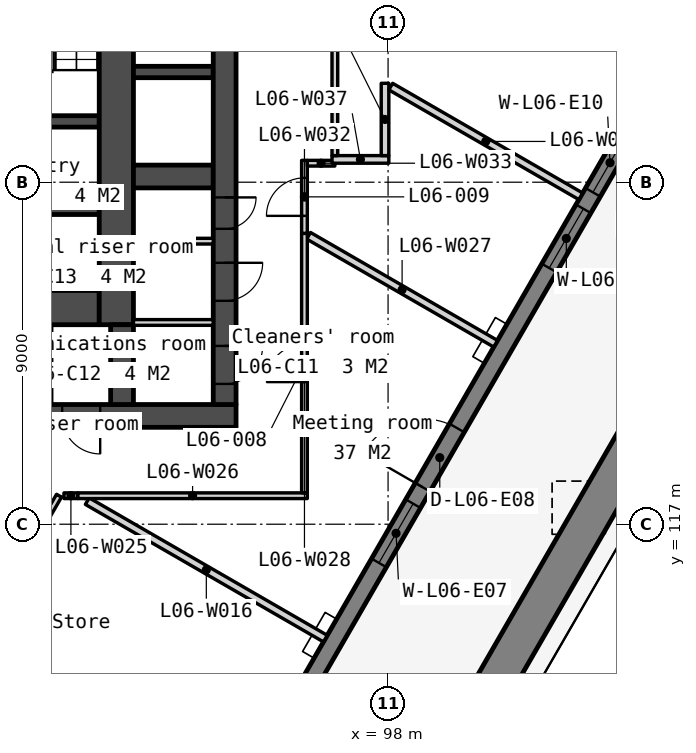
"""IFC4 building model, lengths in metres.
Left out: names, types, materials, properties, quantities, classifications, styles, units other than length and angle.
Written with IfcOpenShell. Run it as: python <this file> out.ifc"""

import sys

from ifc_helpers import new_model, si_unit, direction, frame, frame_2d, origin, place, context, subcontext, project, spatial, polyline, rectangle, outline, extrude, element, fill, save


model = new_model("IFC4")
c1 = context("Model", 3, precision=1e-05, world=origin(), true_north=direction((0.0, 1.0)))
c2 = subcontext(c1, "Body", "Model", "MODEL_VIEW")
j1 = project(units=[si_unit("LENGTHUNIT", "METRE"), si_unit("PLANEANGLEUNIT", "RADIAN")], contexts=[c1])
p1 = place(None, origin())
s1 = spatial("IfcSite", under=j1, at=p1, CompositionType="ELEMENT")
p2 = place(p1, origin())
s2 = spatial("IfcBuilding", under=s1, at=p2, CompositionType="ELEMENT")
p3 = place(p2, frame((0.0, 0.0, 35.0)))
s3 = spatial("IfcBuildingStorey", under=s2, at=p3, CompositionType="ELEMENT", Elevation=35.0)
p4 = place(p3, frame((66.0, 119.85, 0.0), z_axis=(0.0, 0.0, 1.0), x_axis=(1.0, 0.0, 0.0)))
e1 = element("IfcWall", 1, at=p4, inside=s3, PredefinedType="SOLIDWALL", context=c2, shape_type="SweptSolid", body=[
    extrude(rectangle(XDim=28.0, YDim=0.6, at=frame_2d((14.0, 0.0))), origin(), (0.0, 0.0, 1.0), 3.35),
])
p5 = place(p4, frame((6.825, 0.0, 0.0)))
e2 = element("IfcOpeningElement", 2, at=p5, cuts=e1, PredefinedType="OPENING", context=c2, shape_type="SweptSolid", body=[
    extrude(rectangle(XDim=1.8, YDim=2.1, at=frame_2d((0.9, 1.05))), frame((0.0, 0.31, 0.0), z_axis=(0.0, -1.0, 0.0), x_axis=(1.0, 0.0, 0.0)), (0.0, 0.0, 1.0), 0.62),
])
p6 = place(p4, frame((15.85, 0.0, 0.0)))
e3 = element("IfcOpeningElement", 3, at=p6, cuts=e1, PredefinedType="OPENING", context=c2, shape_type="SweptSolid", body=[
    extrude(rectangle(XDim=1.5, YDim=2.1, at=frame_2d((0.75, 1.05))), frame((0.0, 0.31, 0.0), z_axis=(0.0, -1.0, 0.0), x_axis=(1.0, 0.0, 0.0)), (0.0, 0.0, 1.0), 0.62),
])
p7 = place(p4, frame((19.375, 0.0, 0.0)))
e4 = element("IfcOpeningElement", 4, at=p7, cuts=e1, PredefinedType="OPENING", context=c2, shape_type="SweptSolid", body=[
    extrude(rectangle(XDim=1.8, YDim=2.1, at=frame_2d((0.9, 1.05))), frame((0.0, 0.31, 0.0), z_axis=(0.0, -1.0, 0.0), x_axis=(1.0, 0.0, 0.0)), (0.0, 0.0, 1.0), 0.62),
])
p8 = place(p4, frame((4.425, 0.0, 0.0)))
e5 = element("IfcOpeningElement", 5, at=p8, cuts=e1, PredefinedType="OPENING", context=c2, shape_type="SweptSolid", body=[
    extrude(rectangle(XDim=1.0, YDim=2.1, at=frame_2d((0.5, 1.05))), frame((0.0, 0.31, 0.0), z_axis=(0.0, -1.0, 0.0), x_axis=(1.0, 0.0, 0.0)), (0.0, 0.0, 1.0), 0.62),
])
p9 = place(p4, frame((9.925, 0.0, 0.0)))
e6 = element("IfcOpeningElement", 6, at=p9, cuts=e1, PredefinedType="OPENING", context=c2, shape_type="SweptSolid", body=[
    extrude(rectangle(XDim=1.0, YDim=2.1, at=frame_2d((0.5, 1.05))), frame((0.0, 0.31, 0.0), z_axis=(0.0, -1.0, 0.0), x_axis=(1.0, 0.0, 0.0)), (0.0, 0.0, 1.0), 0.62),
])
p10 = place(p4, frame((13.125, 0.0, 0.0)))
e7 = element("IfcOpeningElement", 7, at=p10, cuts=e1, PredefinedType="OPENING", context=c2, shape_type="SweptSolid", body=[
    extrude(rectangle(XDim=1.0, YDim=2.1, at=frame_2d((0.5, 1.05))), frame((0.0, 0.31, 0.0), z_axis=(0.0, -1.0, 0.0), x_axis=(1.0, 0.0, 0.0)), (0.0, 0.0, 1.0), 0.62),
])
p11 = place(p4, frame((21.725, 0.0, 0.0)))
e8 = element("IfcOpeningElement", 8, at=p11, cuts=e1, PredefinedType="OPENING", context=c2, shape_type="SweptSolid", body=[
    extrude(rectangle(XDim=1.0, YDim=2.1, at=frame_2d((0.5, 1.05))), frame((0.0, 0.31, 0.0), z_axis=(0.0, -1.0, 0.0), x_axis=(1.0, 0.0, 0.0)), (0.0, 0.0, 1.0), 0.62),
])
p12 = place(p4, frame((23.425, 0.0, 0.0)))
e9 = element("IfcOpeningElement", 9, at=p12, cuts=e1, PredefinedType="OPENING", context=c2, shape_type="SweptSolid", body=[
    extrude(rectangle(XDim=1.0, YDim=2.1, at=frame_2d((0.5, 1.05))), frame((0.0, 0.31, 0.0), z_axis=(0.0, -1.0, 0.0), x_axis=(1.0, 0.0, 0.0)), (0.0, 0.0, 1.0), 0.62),
])
for number, where, z_axis, x_axis in (
    (10, (87.85, 127.6, 0.0), (0.0, 0.0, 1.0), (1.0, 0.0, 0.0)),
    (11, (87.85, 125.3, 0.0), (0.0, 0.0, 1.0), (1.0, 0.0, 0.0)),
):
    element("IfcWall", number, at=place(p3, frame(where, z_axis=z_axis, x_axis=x_axis)), inside=s3, PredefinedType="SOLIDWALL", context=c2, shape_type="SweptSolid", body=[
        extrude(rectangle(XDim=2.55, YDim=0.3, at=frame_2d((1.275, 0.0))), origin(), (0.0, 0.0, 1.0), 3.35),
    ])
p13 = place(p3, frame((87.85, 122.7, 0.0), z_axis=(0.0, 0.0, 1.0), x_axis=(1.0, 0.0, 0.0)))
e12 = element("IfcWall", 12, at=p13, inside=s3, PredefinedType="SOLIDWALL", context=c2, shape_type="SweptSolid", body=[
    extrude(rectangle(XDim=2.55, YDim=0.9, at=frame_2d((1.275, 0.0))), origin(), (0.0, 0.0, 1.0), 3.35),
])
p14 = place(p3, frame((90.85, 133.95, 0.0), z_axis=(0.0, 0.0, 1.0), x_axis=(0.0, -1.0, 0.0)))
e13 = element("IfcWall", 13, at=p14, inside=s3, PredefinedType="SOLIDWALL", context=c2, shape_type="SweptSolid", body=[
    extrude(rectangle(XDim=11.7, YDim=0.9, at=frame_2d((5.85, 0.0))), origin(), (0.0, 0.0, 1.0), 3.35),
])
p15 = place(p3, frame((91.0, 122.25, 0.0), z_axis=(0.0, 0.0, 1.0), x_axis=(0.0, -1.0, 0.0)))
e14 = element("IfcWall", 14, at=p15, inside=s3, PredefinedType="SOLIDWALL", context=c2, shape_type="SweptSolid", body=[
    extrude(rectangle(XDim=2.1, YDim=0.6, at=frame_2d((1.05, 0.0))), origin(), (0.0, 0.0, 1.0), 3.35),
])
p16 = place(p3, frame((91.3, 128.9, 0.0), z_axis=(0.0, 0.0, 1.0), x_axis=(1.0, 0.0, 0.0)))
e15 = element("IfcWall", 15, at=p16, inside=s3, PredefinedType="SOLIDWALL", context=c2, shape_type="SweptSolid", body=[
    extrude(rectangle(XDim=2.1, YDim=0.3, at=frame_2d((1.05, 0.0))), origin(), (0.0, 0.0, 1.0), 3.35),
])
p17 = place(p3, frame((91.3, 126.15, 0.0), z_axis=(0.0, 0.0, 1.0), x_axis=(1.0, 0.0, 0.0)))
e16 = element("IfcWall", 16, at=p17, inside=s3, PredefinedType="SOLIDWALL", context=c2, shape_type="SweptSolid", body=[
    extrude(rectangle(XDim=2.1, YDim=0.6, at=frame_2d((1.05, 0.0))), origin(), (0.0, 0.0, 1.0), 3.35),
])
for number, where, z_axis, x_axis in (
    (17, (91.3, 124.449, 0.0), (0.0, 0.0, 1.0), (1.0, 0.0, 0.0)),
    (18, (91.3, 122.309, 0.0), (0.0, 0.0, 1.0), (1.0, 0.0, 0.0)),
):
    element("IfcWall", number, at=place(p3, frame(where, z_axis=z_axis, x_axis=x_axis)), inside=s3, PredefinedType="PARTITIONING", context=c2, shape_type="SweptSolid", body=[
        extrude(rectangle(XDim=2.1, YDim=0.15, at=frame_2d((1.05, 0.0))), origin(), (0.0, 0.0, 1.0), 3.35),
    ])
p18 = place(p3, frame((93.7, 133.95, 0.0), z_axis=(0.0, 0.0, 1.0), x_axis=(0.0, -1.0, 0.0)))
e19 = element("IfcWall", 19, at=p18, inside=s3, PredefinedType="SOLIDWALL", context=c2, shape_type="SweptSolid", body=[
    extrude(rectangle(XDim=13.8, YDim=0.6, at=frame_2d((6.9, 0.0))), origin(), (0.0, 0.0, 1.0), 3.35),
])
p19 = place(p18, frame((0.6, 0.0, 0.0)))
e20 = element("IfcOpeningElement", 20, at=p19, cuts=e19, PredefinedType="OPENING", context=c2, shape_type="SweptSolid", body=[
    extrude(rectangle(XDim=1.1, YDim=2.1, at=frame_2d((0.55, 1.05))), frame((0.0, 0.31, 0.0), z_axis=(0.0, -1.0, 0.0), x_axis=(1.0, 0.0, 0.0)), (0.0, 0.0, 1.0), 0.62),
])
p20 = place(p18, frame((8.35, 0.0, 0.0)))
e21 = element("IfcOpeningElement", 21, at=p20, cuts=e19, PredefinedType="OPENING", context=c2, shape_type="SweptSolid", body=[
    extrude(rectangle(XDim=0.826, YDim=2.1, at=frame_2d((0.413, 1.05))), frame((0.0, 0.31, 0.0), z_axis=(0.0, -1.0, 0.0), x_axis=(1.0, 0.0, 0.0)), (0.0, 0.0, 1.0), 0.62),
])
p21 = place(p18, frame((10.071, 0.0, 0.0)))
e22 = element("IfcOpeningElement", 22, at=p21, cuts=e19, PredefinedType="OPENING", context=c2, shape_type="SweptSolid", body=[
    extrude(rectangle(XDim=1.0, YDim=2.1, at=frame_2d((0.5, 1.05))), frame((0.0, 0.31, 0.0), z_axis=(0.0, -1.0, 0.0), x_axis=(1.0, 0.0, 0.0)), (0.0, 0.0, 1.0), 0.62),
])
p22 = place(p18, frame((12.258, 0.0, 0.0)))
e23 = element("IfcOpeningElement", 23, at=p22, cuts=e19, PredefinedType="OPENING", context=c2, shape_type="SweptSolid", body=[
    extrude(rectangle(XDim=1.0, YDim=2.1, at=frame_2d((0.5, 1.05))), frame((0.0, 0.31, 0.0), z_axis=(0.0, -1.0, 0.0), x_axis=(1.0, 0.0, 0.0)), (0.0, 0.0, 1.0), 0.62),
])
p23 = place(p3, frame((0.0, 0.0, -0.2)))
e24 = element("IfcWall", 24, at=p23, inside=s3, PredefinedType="SOLIDWALL", context=c2, shape_type="SweptSolid", body=[
    extrude(outline(polyline([(105.7, 129.284), (105.31, 129.509), (105.18, 129.284), (102.14, 134.55), (102.4, 134.55), (102.4, 135.0), (105.7, 129.284)])), origin(), (0.0, 0.0, 1.0), 3.55),
])
p24 = place(p3, frame((83.105, 90.599, -0.2), z_axis=(0.0, 0.0, 1.0), x_axis=(0.499999201451, 0.866025864826, 0.0)))
e25 = element("IfcWall", 25, at=p24, inside=s3, PredefinedType="SOLIDWALL", context=c2, shape_type="SweptSolid", body=[
    extrude(outline(polyline([(44.8, 0.0), (44.8, 3.55), (0.0, 3.55), (0.0, 0.0), (44.8, 0.0)])), frame((0.0, 0.225, 0.0), z_axis=(0.0, -1.0, 0.0), x_axis=(1.0, 0.0, 0.0)), (0.0, 0.0, 1.0), 0.45),
])
p25 = place(p24, frame((2.43, 0.0, 1.1)))
e26 = element("IfcOpeningElement", 26, at=p25, cuts=e25, PredefinedType="OPENING", context=c2, shape_type="SweptSolid", body=[
    extrude(rectangle(XDim=1.8, YDim=1.5, at=frame_2d((0.9, 0.75))), frame((0.0, 0.235, 0.0), z_axis=(0.0, -1.0, 0.0), x_axis=(1.0, 0.0, 0.0)), (0.0, 0.0, 1.0), 0.47),
])
p26 = place(p24, frame((4.73, 0.0, 0.2)))
e27 = element("IfcOpeningElement", 27, at=p26, cuts=e25, PredefinedType="OPENING", context=c2, shape_type="SweptSolid", body=[
    extrude(rectangle(XDim=1.8, YDim=2.4, at=frame_2d((0.9, 1.2))), frame((0.0, 0.235, 0.0), z_axis=(0.0, -1.0, 0.0), x_axis=(1.0, 0.0, 0.0)), (0.0, 0.0, 1.0), 0.47),
])
p27 = place(p24, frame((11.39, 0.0, 1.1)))
e28 = element("IfcOpeningElement", 28, at=p27, cuts=e25, PredefinedType="OPENING", context=c2, shape_type="SweptSolid", body=[
    extrude(rectangle(XDim=1.8, YDim=1.5, at=frame_2d((0.9, 0.75))), frame((0.0, 0.235, 0.0), z_axis=(0.0, -1.0, 0.0), x_axis=(1.0, 0.0, 0.0)), (0.0, 0.0, 1.0), 0.47),
])
p28 = place(p24, frame((13.69, 0.0, 1.1)))
e29 = element("IfcOpeningElement", 29, at=p28, cuts=e25, PredefinedType="OPENING", context=c2, shape_type="SweptSolid", body=[
    extrude(rectangle(XDim=1.8, YDim=1.5, at=frame_2d((0.9, 0.75))), frame((0.0, 0.235, 0.0), z_axis=(0.0, -1.0, 0.0), x_axis=(1.0, 0.0, 0.0)), (0.0, 0.0, 1.0), 0.47),
])
p29 = place(p24, frame((20.35, 0.0, 0.2)))
e30 = element("IfcOpeningElement", 30, at=p29, cuts=e25, PredefinedType="OPENING", context=c2, shape_type="SweptSolid", body=[
    extrude(rectangle(XDim=1.8, YDim=2.4, at=frame_2d((0.9, 1.2))), frame((0.0, 0.235, 0.0), z_axis=(0.0, -1.0, 0.0), x_axis=(1.0, 0.0, 0.0)), (0.0, 0.0, 1.0), 0.47),
])
p30 = place(p24, frame((22.65, 0.0, 1.1)))
e31 = element("IfcOpeningElement", 31, at=p30, cuts=e25, PredefinedType="OPENING", context=c2, shape_type="SweptSolid", body=[
    extrude(rectangle(XDim=1.8, YDim=1.5, at=frame_2d((0.9, 0.75))), frame((0.0, 0.235, 0.0), z_axis=(0.0, -1.0, 0.0), x_axis=(1.0, 0.0, 0.0)), (0.0, 0.0, 1.0), 0.47),
])
p31 = place(p24, frame((29.31, 0.0, 1.1)))
e32 = element("IfcOpeningElement", 32, at=p31, cuts=e25, PredefinedType="OPENING", context=c2, shape_type="SweptSolid", body=[
    extrude(rectangle(XDim=1.8, YDim=1.5, at=frame_2d((0.9, 0.75))), frame((0.0, 0.235, 0.0), z_axis=(0.0, -1.0, 0.0), x_axis=(1.0, 0.0, 0.0)), (0.0, 0.0, 1.0), 0.47),
])
p32 = place(p24, frame((31.61, 0.0, 0.2)))
e33 = element("IfcOpeningElement", 33, at=p32, cuts=e25, PredefinedType="OPENING", context=c2, shape_type="SweptSolid", body=[
    extrude(rectangle(XDim=1.8, YDim=2.4, at=frame_2d((0.9, 1.2))), frame((0.0, 0.235, 0.0), z_axis=(0.0, -1.0, 0.0), x_axis=(1.0, 0.0, 0.0)), (0.0, 0.0, 1.0), 0.47),
])
p33 = place(p24, frame((38.27, 0.0, 1.1)))
e34 = element("IfcOpeningElement", 34, at=p33, cuts=e25, PredefinedType="OPENING", context=c2, shape_type="SweptSolid", body=[
    extrude(rectangle(XDim=1.8, YDim=1.5, at=frame_2d((0.9, 0.75))), frame((0.0, 0.235, 0.0), z_axis=(0.0, -1.0, 0.0), x_axis=(1.0, 0.0, 0.0)), (0.0, 0.0, 1.0), 0.47),
])
p34 = place(p24, frame((40.57, 0.0, 1.1)))
e35 = element("IfcOpeningElement", 35, at=p34, cuts=e25, PredefinedType="OPENING", context=c2, shape_type="SweptSolid", body=[
    extrude(rectangle(XDim=1.8, YDim=1.5, at=frame_2d((0.9, 0.75))), frame((0.0, 0.235, 0.0), z_axis=(0.0, -1.0, 0.0), x_axis=(1.0, 0.0, 0.0)), (0.0, 0.0, 1.0), 0.47),
])
p35 = place(p3, frame((110.208, 129.091, 0.0), z_axis=(0.0, 0.0, 1.0), x_axis=(-0.500001932243, -0.8660242882, 0.0)))
e36 = element("IfcWall", 36, at=p35, inside=s3, PredefinedType="STANDARD", context=c2, shape_type="SweptSolid", body=[
    extrude(rectangle(XDim=54.747, YDim=1.0, at=frame_2d((27.374, 0.0))), origin(), (0.0, 0.0, 1.0), 0.6),
])
p36 = place(p3, frame((0.0, 0.0, 0.04)))
e37 = element("IfcWall", 37, at=p36, inside=s3, PredefinedType="SOLIDWALL", context=c2, shape_type="SweptSolid", body=[
    extrude(outline(polyline([(105.7, 129.284), (107.455, 134.141), (102.4, 135.0), (105.7, 129.284)])), origin(), (0.0, 0.0, 1.0), 3.31),
])
p37 = place(p3, frame((90.085, 117.607, 0.0), z_axis=(0.0, 0.0, 1.0), x_axis=(0.866027117883, -0.499997031082, 0.0)))
e38 = element("IfcWall", 38, at=p37, inside=s3, PredefinedType="PARTITIONING", context=c2, shape_type="SweptSolid", body=[
    extrude(rectangle(XDim=7.235, YDim=0.2, at=frame_2d((3.617, 0.0))), origin(), (0.0, 0.0, 1.0), 3.35),
])
p38 = place(p3, frame((84.985, 110.206, 0.0), z_axis=(0.0, 0.0, 1.0), x_axis=(0.500015174863, 0.866016642396, 0.0)))
e39 = element("IfcWall", 39, at=p38, inside=s3, PredefinedType="PARTITIONING", context=c2, shape_type="SweptSolid", body=[
    extrude(rectangle(XDim=8.712, YDim=0.15, at=frame_2d((4.356, 0.0))), origin(), (0.0, 0.0, 1.0), 3.35),
])
p39 = place(p38, frame((3.856, 0.0, 0.0)))
e40 = element("IfcOpeningElement", 40, at=p39, cuts=e39, PredefinedType="OPENING", context=c2, shape_type="SweptSolid", body=[
    extrude(rectangle(XDim=1.0, YDim=2.1, at=frame_2d((0.5, 1.05))), frame((0.0, 0.085, 0.0), z_axis=(0.0, -1.0, 0.0), x_axis=(1.0, 0.0, 0.0)), (0.0, 0.0, 1.0), 0.17),
])
p40 = place(p3, frame((89.471, 117.75, 0.0), z_axis=(0.0, 0.0, 1.0), x_axis=(1.0, 0.0, 0.0)))
e41 = element("IfcWall", 41, at=p40, inside=s3, PredefinedType="PARTITIONING", context=c2, shape_type="SweptSolid", body=[
    extrude(rectangle(XDim=0.367, YDim=0.15, at=frame_2d((0.183, 0.0))), origin(), (0.0, 0.0, 1.0), 3.35),
])
p41 = place(p3, frame((89.838, 117.75, 0.0), z_axis=(0.0, 0.0, 1.0), x_axis=(1.0, 0.0, 0.0)))
e42 = element("IfcWall", 42, at=p41, inside=s3, PredefinedType="PARTITIONING", context=c2, shape_type="SweptSolid", body=[
    extrude(rectangle(XDim=6.037, YDim=0.15, at=frame_2d((3.019, 0.0))), origin(), (0.0, 0.0, 1.0), 3.35),
])
p42 = place(p3, frame((95.908, 124.591, 0.0), z_axis=(0.0, 0.0, 1.0), x_axis=(0.866043237112, -0.499969110498, 0.0)))
e43 = element("IfcWall", 43, at=p42, inside=s3, PredefinedType="PARTITIONING", context=c2, shape_type="SweptSolid", body=[
    extrude(rectangle(XDim=5.683, YDim=0.2, at=frame_2d((2.842, 0.0))), origin(), (0.0, 0.0, 1.0), 3.35),
])
p43 = place(p3, frame((95.8, 117.825, 0.0), z_axis=(0.0, 0.0, 1.0), x_axis=(0.0, 1.0, 0.0)))
e44 = element("IfcWall", 44, at=p43, inside=s3, PredefinedType="PARTITIONING", context=c2, shape_type="SweptSolid", body=[
    extrude(rectangle(XDim=6.829, YDim=0.15, at=frame_2d((3.415, 0.0))), origin(), (0.0, 0.0, 1.0), 3.35),
])
p44 = place(p43, frame((2.915, 0.0, 0.0)))
e45 = element("IfcOpeningElement", 45, at=p44, cuts=e44, PredefinedType="OPENING", context=c2, shape_type="SweptSolid", body=[
    extrude(rectangle(XDim=1.0, YDim=2.1, at=frame_2d((0.5, 1.05))), frame((0.0, 0.085, 0.0), z_axis=(0.0, -1.0, 0.0), x_axis=(1.0, 0.0, 0.0)), (0.0, 0.0, 1.0), 0.17),
])
p45 = place(p3, frame((95.8, 124.654, 0.0), z_axis=(0.0, 0.0, 1.0), x_axis=(0.0, 1.0, 0.0)))
e46 = element("IfcWall", 46, at=p45, inside=s3, PredefinedType="PARTITIONING", context=c2, shape_type="SweptSolid", body=[
    extrude(rectangle(XDim=1.921, YDim=0.15, at=frame_2d((0.96, 0.0))), origin(), (0.0, 0.0, 1.0), 3.35),
])
p46 = place(p45, frame((0.46, 0.0, 0.0)))
e47 = element("IfcOpeningElement", 47, at=p46, cuts=e46, PredefinedType="OPENING", context=c2, shape_type="SweptSolid", body=[
    extrude(rectangle(XDim=1.0, YDim=2.1, at=frame_2d((0.5, 1.05))), frame((0.0, 0.085, 0.0), z_axis=(0.0, -1.0, 0.0), x_axis=(1.0, 0.0, 0.0)), (0.0, 0.0, 1.0), 0.17),
])
p47 = place(p3, frame((95.875, 126.5, 0.0), z_axis=(0.0, 0.0, 1.0), x_axis=(1.0, 0.0, 0.0)))
e48 = element("IfcWall", 48, at=p47, inside=s3, PredefinedType="PARTITIONING", context=c2, shape_type="SweptSolid", body=[
    extrude(rectangle(XDim=0.725, YDim=0.15, at=frame_2d((0.363, 0.0))), origin(), (0.0, 0.0, 1.0), 3.35),
])
p48 = place(p3, frame((96.525, 126.6, 0.0), z_axis=(0.0, 0.0, 1.0), x_axis=(1.0, 0.0, 0.0)))
e49 = element("IfcWall", 49, at=p48, inside=s3, PredefinedType="PARTITIONING", context=c2, shape_type="SweptSolid", body=[
    extrude(rectangle(XDim=1.495, YDim=0.2, at=frame_2d((0.748, 0.0))), origin(), (0.0, 0.0, 1.0), 3.35),
])
p49 = place(p3, frame((97.92, 126.7, 0.0), z_axis=(0.0, 0.0, 1.0), x_axis=(0.0, 1.0, 0.0)))
e50 = element("IfcWall", 50, at=p49, inside=s3, PredefinedType="PARTITIONING", context=c2, shape_type="SweptSolid", body=[
    extrude(rectangle(XDim=1.903, YDim=0.2, at=frame_2d((0.952, 0.0))), origin(), (0.0, 0.0, 1.0), 3.35),
])
p50 = place(p3, frame((98.07, 128.516, 0.0), z_axis=(0.0, 0.0, 1.0), x_axis=(0.866020109775, -0.500009169381, 0.0)))
e51 = element("IfcWall", 51, at=p50, inside=s3, PredefinedType="PARTITIONING", context=c2, shape_type="SweptSolid", body=[
    extrude(rectangle(XDim=5.774, YDim=0.2, at=frame_2d((2.887, 0.0))), origin(), (0.0, 0.0, 1.0), 3.35),
])
p51 = place(p3, frame((96.6, 133.925, 0.0), z_axis=(0.0, 0.0, 1.0), x_axis=(6.7581266e-05, -0.999999997716, 0.0)))
e52 = element("IfcWall", 52, at=p51, inside=s3, PredefinedType="PARTITIONING", context=c2, shape_type="SweptSolid", body=[
    extrude(rectangle(XDim=7.225, YDim=0.15, at=frame_2d((3.613, 0.0))), origin(), (0.0, 0.0, 1.0), 3.35),
])
p52 = place(p51, frame((3.113, 0.0, 0.0)))
e53 = element("IfcOpeningElement", 53, at=p52, cuts=e52, PredefinedType="OPENING", context=c2, shape_type="SweptSolid", body=[
    extrude(rectangle(XDim=1.0, YDim=2.1, at=frame_2d((0.5, 1.05))), frame((0.0, 0.085, 0.0), z_axis=(0.0, -1.0, 0.0), x_axis=(1.0, 0.0, 0.0)), (0.0, 0.0, 1.0), 0.17),
])
p53 = place(p20, origin())
e54 = element("IfcDoor", 54, at=p53, inside=s3, OperationType="SINGLE_SWING_LEFT", PredefinedType="DOOR", context=c2, shape_type="SweptSolid", body=[
    extrude(rectangle(XDim=0.826, YDim=2.1, at=frame_2d((0.413, 1.05))), frame((0.0, 0.025, 0.0), z_axis=(0.0, -1.0, 0.0), x_axis=(1.0, 0.0, 0.0)), (0.0, 0.0, 1.0), 0.05),
])
fill(e21, e54)
p54 = place(p21, origin())
e55 = element("IfcDoor", 55, at=p54, inside=s3, OperationType="SINGLE_SWING_LEFT", PredefinedType="DOOR", context=c2, shape_type="SweptSolid", body=[
    extrude(rectangle(XDim=1.0, YDim=2.1, at=frame_2d((0.5, 1.05))), frame((0.0, 0.025, 0.0), z_axis=(0.0, -1.0, 0.0), x_axis=(1.0, 0.0, 0.0)), (0.0, 0.0, 1.0), 0.05),
])
fill(e22, e55)
p55 = place(p22, origin())
e56 = element("IfcDoor", 56, at=p55, inside=s3, OperationType="SINGLE_SWING_LEFT", PredefinedType="DOOR", context=c2, shape_type="SweptSolid", body=[
    extrude(rectangle(XDim=1.0, YDim=2.1, at=frame_2d((0.5, 1.05))), frame((0.0, 0.025, 0.0), z_axis=(0.0, -1.0, 0.0), x_axis=(1.0, 0.0, 0.0)), (0.0, 0.0, 1.0), 0.05),
])
fill(e23, e56)
p56 = place(p12, origin())
e57 = element("IfcDoor", 57, at=p56, inside=s3, OperationType="SINGLE_SWING_RIGHT", PredefinedType="DOOR", context=c2, shape_type="SweptSolid", body=[
    extrude(rectangle(XDim=1.0, YDim=2.1, at=frame_2d((0.5, 1.05))), frame((0.0, 0.025, 0.0), z_axis=(0.0, -1.0, 0.0), x_axis=(1.0, 0.0, 0.0)), (0.0, 0.0, 1.0), 0.05),
])
fill(e9, e57)
p57 = place(p31, origin())
e58 = element("IfcWindow", 58, at=p57, inside=s3, PartitioningType="SINGLE_PANEL", PredefinedType="WINDOW", context=c2, shape_type="SweptSolid", body=[
    extrude(rectangle(XDim=1.8, YDim=1.5, at=frame_2d((0.9, 0.75))), frame((0.0, 0.03, 0.0), z_axis=(0.0, -1.0, 0.0), x_axis=(1.0, 0.0, 0.0)), (0.0, 0.0, 1.0), 0.06),
])
fill(e32, e58)
p58 = place(p32, origin())
e59 = element("IfcDoor", 59, at=p58, inside=s3, OperationType="SINGLE_SWING_LEFT", PredefinedType="DOOR", context=c2, shape_type="SweptSolid", body=[
    extrude(rectangle(XDim=1.8, YDim=2.4, at=frame_2d((0.9, 1.2))), frame((0.0, 0.025, 0.0), z_axis=(0.0, -1.0, 0.0), x_axis=(1.0, 0.0, 0.0)), (0.0, 0.0, 1.0), 0.05),
])
fill(e33, e59)
p59 = place(p33, origin())
e60 = element("IfcWindow", 60, at=p59, inside=s3, PartitioningType="SINGLE_PANEL", PredefinedType="WINDOW", context=c2, shape_type="SweptSolid", body=[
    extrude(rectangle(XDim=1.8, YDim=1.5, at=frame_2d((0.9, 0.75))), frame((0.0, 0.03, 0.0), z_axis=(0.0, -1.0, 0.0), x_axis=(1.0, 0.0, 0.0)), (0.0, 0.0, 1.0), 0.06),
])
fill(e34, e60)
p60 = place(p34, origin())
e61 = element("IfcWindow", 61, at=p60, inside=s3, PartitioningType="SINGLE_PANEL", PredefinedType="WINDOW", context=c2, shape_type="SweptSolid", body=[
    extrude(rectangle(XDim=1.8, YDim=1.5, at=frame_2d((0.9, 0.75))), frame((0.0, 0.03, 0.0), z_axis=(0.0, -1.0, 0.0), x_axis=(1.0, 0.0, 0.0)), (0.0, 0.0, 1.0), 0.06),
])
fill(e35, e61)
p61 = place(p44, origin())
e62 = element("IfcDoor", 62, at=p61, inside=s3, OperationType="SINGLE_SWING_LEFT", PredefinedType="DOOR", context=c2, shape_type="SweptSolid", body=[
    extrude(rectangle(XDim=1.0, YDim=2.1, at=frame_2d((0.5, 1.05))), frame((0.0, 0.025, 0.0), z_axis=(0.0, -1.0, 0.0), x_axis=(1.0, 0.0, 0.0)), (0.0, 0.0, 1.0), 0.05),
])
fill(e45, e62)
p62 = place(p46, origin())
e63 = element("IfcDoor", 63, at=p62, inside=s3, OperationType="SINGLE_SWING_LEFT", PredefinedType="DOOR", context=c2, shape_type="SweptSolid", body=[
    extrude(rectangle(XDim=1.0, YDim=2.1, at=frame_2d((0.5, 1.05))), frame((0.0, 0.025, 0.0), z_axis=(0.0, -1.0, 0.0), x_axis=(1.0, 0.0, 0.0)), (0.0, 0.0, 1.0), 0.05),
])
fill(e47, e63)
save(model, sys.argv[1])
